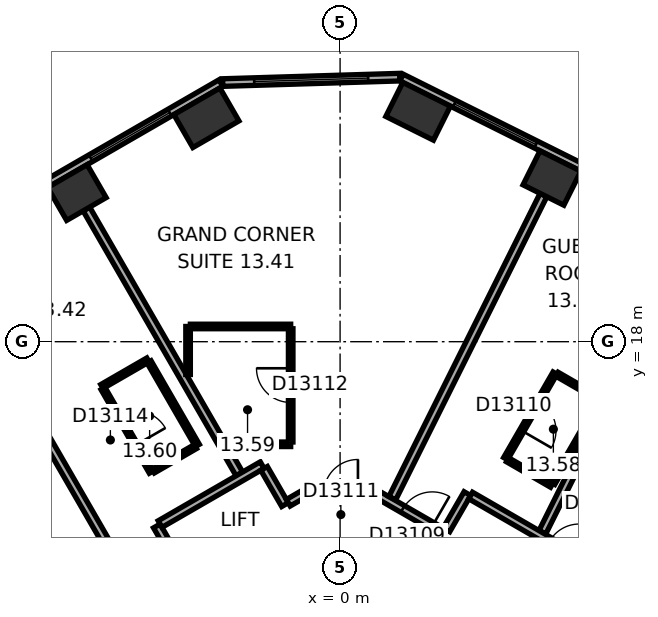
"""IFC4 building model, lengths in metres.
Left out: names, types, materials, properties, quantities, classifications, styles, units other than length and angle.
Written with IfcOpenShell. Run it as: python <this file> out.ifc"""

import sys

from ifc_helpers import new_model, si_unit, direction, frame, frame_2d, origin, origin_2d, place, context, subcontext, project, spatial, rectangle, extrude, element, fill, save


model = new_model("IFC4")
c1 = context("Model", 3, precision=1e-05, world=origin(), true_north=direction((0.0, 1.0)))
c2 = subcontext(c1, "Body", "Model", "MODEL_VIEW")
j1 = project(units=[si_unit("LENGTHUNIT", "METRE"), si_unit("PLANEANGLEUNIT", "RADIAN")], contexts=[c1])
p1 = place(None, origin())
s1 = spatial("IfcSite", under=j1, at=p1, CompositionType="ELEMENT")
p2 = place(p1, origin())
s2 = spatial("IfcBuilding", under=s1, at=p2, CompositionType="ELEMENT")
p3 = place(p2, frame((0.0, 0.0, 63.8)))
s3 = spatial("IfcBuildingStorey", under=s2, at=p3, CompositionType="ELEMENT", Elevation=63.8)
p4 = place(p3, frame((5.574, 22.306, 0.0), z_axis=(0.0, 0.0, 1.0), x_axis=(-0.894934361602, 0.44619781311, 0.0)))
e1 = element("IfcColumn", 1, at=p4, inside=s3, PredefinedType="COLUMN", context=c2, shape_type="SweptSolid", body=[
    extrude(rectangle(XDim=1.2, YDim=1.0, at=origin_2d()), origin(), (0.0, 0.0, 1.0), 3.3),
])
for number, where, z_axis, x_axis in (
    (2, (2.053, 24.062, 0.0), (0.0, 0.0, 1.0), (-0.895, 0.446, 0.0)),
    (3, (-3.518, 23.892, 0.0), (0.0, 0.0, 1.0), (-0.866, -0.5, 0.0)),
):
    element("IfcColumn", number, at=place(p3, frame(where, z_axis=z_axis, x_axis=x_axis)), inside=s3, PredefinedType="COLUMN", context=c2, shape_type="SweptSolid", body=[
        extrude(rectangle(XDim=1.4, YDim=1.0, at=origin_2d()), origin(), (0.0, 0.0, 1.0), 3.3),
    ])
p5 = place(p3, frame((-6.926, 21.925, 0.0), z_axis=(0.0, 0.0, 1.0), x_axis=(-0.866025403784, -0.5, 0.0)))
e4 = element("IfcColumn", 4, at=p5, inside=s3, PredefinedType="COLUMN", context=c2, shape_type="SweptSolid", body=[
    extrude(rectangle(XDim=1.2, YDim=1.0, at=origin_2d()), origin(), (0.0, 0.0, 1.0), 3.3),
])
p6 = place(p3, frame((20.63, 15.47, 0.0), z_axis=(0.0, 0.0, 1.0), x_axis=(-0.894934518609, 0.446197498203, 0.0)))
e5 = element("IfcWall", 5, at=p6, inside=s3, PredefinedType="STANDARD", context=c2, shape_type="SweptSolid", body=[
    extrude(rectangle(XDim=21.246, YDim=0.2, at=frame_2d((10.623, 0.0))), origin(), (0.0, 0.0, 1.0), 3.3),
])
p7 = place(p6, frame((1.553, 0.0, 0.8)))
e6 = element("IfcOpeningElement", 6, at=p7, cuts=e5, PredefinedType="OPENING", context=c2, shape_type="SweptSolid", body=[
    extrude(rectangle(XDim=2.4, YDim=1.7, at=frame_2d((1.2, 0.85))), frame((0.0, 0.11, 0.0), z_axis=(0.0, -1.0, 0.0), x_axis=(1.0, 0.0, 0.0)), (0.0, 0.0, 1.0), 0.22),
])
p8 = place(p6, frame((5.488, 0.0, 0.8)))
e7 = element("IfcOpeningElement", 7, at=p8, cuts=e5, PredefinedType="OPENING", context=c2, shape_type="SweptSolid", body=[
    extrude(rectangle(XDim=2.4, YDim=1.7, at=frame_2d((1.2, 0.85))), frame((0.0, 0.11, 0.0), z_axis=(0.0, -1.0, 0.0), x_axis=(1.0, 0.0, 0.0)), (0.0, 0.0, 1.0), 0.22),
])
p9 = place(p6, frame((9.422, 0.0, 0.8)))
e8 = element("IfcOpeningElement", 8, at=p9, cuts=e5, PredefinedType="OPENING", context=c2, shape_type="SweptSolid", body=[
    extrude(rectangle(XDim=2.4, YDim=1.7, at=frame_2d((1.2, 0.85))), frame((0.0, 0.11, 0.0), z_axis=(0.0, -1.0, 0.0), x_axis=(1.0, 0.0, 0.0)), (0.0, 0.0, 1.0), 0.22),
])
p10 = place(p6, frame((13.357, 0.0, 0.8)))
e9 = element("IfcOpeningElement", 9, at=p10, cuts=e5, PredefinedType="OPENING", context=c2, shape_type="SweptSolid", body=[
    extrude(rectangle(XDim=2.4, YDim=1.7, at=frame_2d((1.2, 0.85))), frame((0.0, 0.11, 0.0), z_axis=(0.0, -1.0, 0.0), x_axis=(1.0, 0.0, 0.0)), (0.0, 0.0, 1.0), 0.22),
])
p11 = place(p6, frame((17.292, 0.0, 0.8)))
e10 = element("IfcOpeningElement", 10, at=p11, cuts=e5, PredefinedType="OPENING", context=c2, shape_type="SweptSolid", body=[
    extrude(rectangle(XDim=2.4, YDim=1.7, at=frame_2d((1.2, 0.85))), frame((0.0, 0.11, 0.0), z_axis=(0.0, -1.0, 0.0), x_axis=(1.0, 0.0, 0.0)), (0.0, 0.0, 1.0), 0.22),
])
p12 = place(p3, frame((1.568, 24.961, 0.0), z_axis=(0.0, 0.0, 1.0), x_axis=(-0.999533359013, -0.030546099927, 0.0)))
e11 = element("IfcWall", 11, at=p12, inside=s3, PredefinedType="STANDARD", context=c2, shape_type="SweptSolid", body=[
    extrude(rectangle(XDim=4.66, YDim=0.2, at=frame_2d((2.33, 0.0))), origin(), (0.0, 0.0, 1.0), 3.3),
])
p13 = place(p12, frame((0.83, 0.0, 0.8)))
e12 = element("IfcOpeningElement", 12, at=p13, cuts=e11, PredefinedType="OPENING", context=c2, shape_type="SweptSolid", body=[
    extrude(rectangle(XDim=3.0, YDim=1.7, at=frame_2d((1.5, 0.85))), frame((0.0, 0.11, 0.0), z_axis=(0.0, -1.0, 0.0), x_axis=(1.0, 0.0, 0.0)), (0.0, 0.0, 1.0), 0.22),
])
p14 = place(p3, frame((-3.136, 24.805, 0.0), z_axis=(0.0, 0.0, 1.0), x_axis=(-0.866028291626, -0.499994998079, 0.0)))
e13 = element("IfcWall", 13, at=p14, inside=s3, PredefinedType="STANDARD", context=c2, shape_type="SweptSolid", body=[
    extrude(rectangle(XDim=21.246, YDim=0.2, at=frame_2d((10.623, 0.0))), origin(), (0.0, 0.0, 1.0), 3.3),
])
p15 = place(p14, frame((1.555, 0.0, 0.8)))
e14 = element("IfcOpeningElement", 14, at=p15, cuts=e13, PredefinedType="OPENING", context=c2, shape_type="SweptSolid", body=[
    extrude(rectangle(XDim=2.4, YDim=1.7, at=frame_2d((1.2, 0.85))), frame((0.0, 0.11, 0.0), z_axis=(0.0, -1.0, 0.0), x_axis=(1.0, 0.0, 0.0)), (0.0, 0.0, 1.0), 0.22),
])
p16 = place(p14, frame((5.489, 0.0, 0.8)))
e15 = element("IfcOpeningElement", 15, at=p16, cuts=e13, PredefinedType="OPENING", context=c2, shape_type="SweptSolid", body=[
    extrude(rectangle(XDim=2.4, YDim=1.7, at=frame_2d((1.2, 0.85))), frame((0.0, 0.11, 0.0), z_axis=(0.0, -1.0, 0.0), x_axis=(1.0, 0.0, 0.0)), (0.0, 0.0, 1.0), 0.22),
])
p17 = place(p14, frame((9.424, 0.0, 0.8)))
e16 = element("IfcOpeningElement", 16, at=p17, cuts=e13, PredefinedType="OPENING", context=c2, shape_type="SweptSolid", body=[
    extrude(rectangle(XDim=2.4, YDim=1.7, at=frame_2d((1.2, 0.85))), frame((0.0, 0.11, 0.0), z_axis=(0.0, -1.0, 0.0), x_axis=(1.0, 0.0, 0.0)), (0.0, 0.0, 1.0), 0.22),
])
p18 = place(p14, frame((13.358, 0.0, 0.8)))
e17 = element("IfcOpeningElement", 17, at=p18, cuts=e13, PredefinedType="OPENING", context=c2, shape_type="SweptSolid", body=[
    extrude(rectangle(XDim=2.4, YDim=1.7, at=frame_2d((1.2, 0.85))), frame((0.0, 0.11, 0.0), z_axis=(0.0, -1.0, 0.0), x_axis=(1.0, 0.0, 0.0)), (0.0, 0.0, 1.0), 0.22),
])
p19 = place(p14, frame((17.293, 0.0, 0.8)))
e18 = element("IfcOpeningElement", 18, at=p19, cuts=e13, PredefinedType="OPENING", context=c2, shape_type="SweptSolid", body=[
    extrude(rectangle(XDim=2.4, YDim=1.7, at=frame_2d((1.2, 0.85))), frame((0.0, 0.11, 0.0), z_axis=(0.0, -1.0, 0.0), x_axis=(1.0, 0.0, 0.0)), (0.0, 0.0, 1.0), 0.22),
])
p20 = place(p3, frame((-10.083, 19.524, 0.0), z_axis=(0.0, 0.0, 1.0), x_axis=(0.499999662836, -0.866025598446, 0.0)))
e19 = element("IfcWall", 19, at=p20, inside=s3, PredefinedType="PARTITIONING", context=c2, shape_type="SweptSolid", body=[
    extrude(rectangle(XDim=9.25, YDim=0.2, at=frame_2d((4.625, 0.0))), origin(), (0.0, 0.0, 1.0), 2.6),
])
p21 = place(p3, frame((-6.676, 21.492, 0.0), z_axis=(0.0, 0.0, 1.0), x_axis=(0.500011263043, -0.866018900966, 0.0)))
e20 = element("IfcWall", 20, at=p21, inside=s3, PredefinedType="PARTITIONING", context=c2, shape_type="SweptSolid", body=[
    extrude(rectangle(XDim=8.049, YDim=0.2, at=frame_2d((4.024, 0.0))), origin(), (0.0, 0.0, 1.0), 3.05),
])
p22 = place(p3, frame((-6.268, 16.82, 0.0), z_axis=(0.0, 0.0, 1.0), x_axis=(0.866002662425, 0.500039387122, 0.0)))
e21 = element("IfcWall", 21, at=p22, inside=s3, PredefinedType="PARTITIONING", context=c2, shape_type="SweptSolid", body=[
    extrude(rectangle(XDim=1.4, YDim=0.12, at=frame_2d((0.7, 0.0))), origin(), (0.0, 0.0, 1.0), 3.05),
])
p23 = place(p3, frame((-5.026, 17.469, 0.0), z_axis=(0.0, 0.0, 1.0), x_axis=(0.500005339912, -0.866022320763, 0.0)))
e22 = element("IfcWall", 22, at=p23, inside=s3, PredefinedType="PARTITIONING", context=c2, shape_type="SweptSolid", body=[
    extrude(rectangle(XDim=2.54, YDim=0.12, at=frame_2d((1.27, 0.0))), origin(), (0.0, 0.0, 1.0), 3.05),
])
p24 = place(p3, frame((-4.968, 14.569, 0.0), z_axis=(0.0, 0.0, 1.0), x_axis=(-0.500046963369, 0.865998287773, 0.0)))
e23 = element("IfcWall", 23, at=p24, inside=s3, PredefinedType="PARTITIONING", context=c2, shape_type="SweptSolid", body=[
    extrude(rectangle(XDim=2.54, YDim=0.12, at=frame_2d((1.27, 0.0))), origin(), (0.0, 0.0, 1.0), 3.05),
])
p25 = place(p24, frame((0.82, 0.0, 0.0)))
e24 = element("IfcOpeningElement", 24, at=p25, cuts=e23, PredefinedType="OPENING", context=c2, shape_type="SweptSolid", body=[
    extrude(rectangle(XDim=0.9, YDim=2.1, at=frame_2d((0.45, 1.05))), frame((0.0, 0.07, 0.0), z_axis=(0.0, -1.0, 0.0), x_axis=(1.0, 0.0, 0.0)), (0.0, 0.0, 1.0), 0.14),
])
p26 = place(p3, frame((-4.823, 13.152, 0.0), z_axis=(0.0, 0.0, 1.0), x_axis=(0.499986357472, -0.866033280158, 0.0)))
e25 = element("IfcWall", 25, at=p26, inside=s3, PredefinedType="PARTITIONING", context=c2, shape_type="SweptSolid", body=[
    extrude(rectangle(XDim=1.201, YDim=0.2, at=frame_2d((0.601, 0.0))), origin(), (0.0, 0.0, 1.0), 3.05),
])
p27 = place(p3, frame((-4.0, 17.137, 0.0), z_axis=(0.0, 0.0, 1.0), x_axis=(0.0, 1.0, 0.0)))
e26 = element("IfcWall", 26, at=p27, inside=s3, PredefinedType="PARTITIONING", context=c2, shape_type="SweptSolid", body=[
    extrude(rectangle(XDim=1.263, YDim=0.12, at=frame_2d((0.632, 0.0))), origin(), (0.0, 0.0, 1.0), 3.05),
])
p28 = place(p3, frame((-3.94, 18.401, 0.0), z_axis=(0.0, 0.0, 1.0), x_axis=(1.0, 0.0, 0.0)))
e27 = element("IfcWall", 27, at=p28, inside=s3, PredefinedType="PARTITIONING", context=c2, shape_type="SweptSolid", body=[
    extrude(rectangle(XDim=2.64, YDim=0.12, at=frame_2d((1.32, 0.0))), origin(), (0.0, 0.0, 1.0), 3.05),
])
p29 = place(p3, frame((-3.808, 15.239, 0.0), z_axis=(0.0, 0.0, 1.0), x_axis=(-0.866087136806, -0.499893060024, 0.0)))
e28 = element("IfcWall", 28, at=p29, inside=s3, PredefinedType="PARTITIONING", context=c2, shape_type="SweptSolid", body=[
    extrude(rectangle(XDim=1.28, YDim=0.12, at=frame_2d((0.64, 0.0))), origin(), (0.0, 0.0, 1.0), 3.05),
])
p30 = place(p3, frame((-2.05, 14.752, 0.0), z_axis=(0.0, 0.0, 1.0), x_axis=(-0.866030936828, -0.499990416364, 0.0)))
e29 = element("IfcWall", 29, at=p30, inside=s3, PredefinedType="PARTITIONING", context=c2, shape_type="SweptSolid", body=[
    extrude(rectangle(XDim=3.102, YDim=0.2, at=frame_2d((1.551, 0.0))), origin(), (0.0, 0.0, 1.0), 3.05),
])
p31 = place(p3, frame((-1.449, 13.712, 0.0), z_axis=(0.0, 0.0, 1.0), x_axis=(-0.499978356969, 0.866037899034, 0.0)))
e30 = element("IfcWall", 30, at=p31, inside=s3, PredefinedType="PARTITIONING", context=c2, shape_type="SweptSolid", body=[
    extrude(rectangle(XDim=1.101, YDim=0.2, at=frame_2d((0.551, 0.0))), origin(), (0.0, 0.0, 1.0), 3.05),
])
p32 = place(p3, frame((-1.3, 15.301, 0.0), z_axis=(0.0, 0.0, 1.0), x_axis=(-1.0, 0.0, 0.0)))
e31 = element("IfcWall", 31, at=p32, inside=s3, PredefinedType="PARTITIONING", context=c2, shape_type="SweptSolid", body=[
    extrude(rectangle(XDim=1.661, YDim=0.12, at=frame_2d((0.831, 0.0))), origin(), (0.0, 0.0, 1.0), 3.05),
])
p33 = place(p3, frame((-1.3, 18.341, 0.0), z_axis=(0.0, 0.0, 1.0), x_axis=(0.0, -1.0, 0.0)))
e32 = element("IfcWall", 32, at=p33, inside=s3, PredefinedType="PARTITIONING", context=c2, shape_type="SweptSolid", body=[
    extrude(rectangle(XDim=2.98, YDim=0.12, at=frame_2d((1.49, 0.0))), origin(), (0.0, 0.0, 1.0), 3.05),
])
p34 = place(p33, frame((1.04, 0.0, 0.0)))
e33 = element("IfcOpeningElement", 33, at=p34, cuts=e32, PredefinedType="OPENING", context=c2, shape_type="SweptSolid", body=[
    extrude(rectangle(XDim=0.9, YDim=2.1, at=frame_2d((0.45, 1.05))), frame((0.0, 0.07, 0.0), z_axis=(0.0, -1.0, 0.0), x_axis=(1.0, 0.0, 0.0)), (0.0, 0.0, 1.0), 0.14),
])
p35 = place(p3, frame((-0.95, 14.001, 0.0), z_axis=(0.0, 0.0, 1.0), x_axis=(-0.86609177584, -0.499885022602, 0.0)))
e34 = element("IfcWall", 34, at=p35, inside=s3, PredefinedType="PARTITIONING", context=c2, shape_type="SweptSolid", body=[
    extrude(rectangle(XDim=0.477, YDim=0.2, at=frame_2d((0.238, 0.0))), origin(), (0.0, 0.0, 1.0), 3.05),
])
p36 = place(p3, frame((0.95, 14.001, 0.0), z_axis=(0.0, 0.0, 1.0), x_axis=(-1.0, 0.0, 0.0)))
e35 = element("IfcWall", 35, at=p36, inside=s3, PredefinedType="PARTITIONING", context=c2, shape_type="SweptSolid", body=[
    extrude(rectangle(XDim=1.86, YDim=0.2, at=frame_2d((0.93, 0.0))), origin(), (0.0, 0.0, 1.0), 3.05),
])
p37 = place(p36, frame((0.48, 0.0, 0.0)))
e36 = element("IfcOpeningElement", 36, at=p37, cuts=e35, PredefinedType="OPENING", context=c2, shape_type="SweptSolid", body=[
    extrude(rectangle(XDim=0.9, YDim=2.1, at=frame_2d((0.45, 1.05))), frame((0.0, 0.11, 0.0), z_axis=(0.0, -1.0, 0.0), x_axis=(1.0, 0.0, 0.0)), (0.0, 0.0, 1.0), 0.22),
])
p38 = place(p3, frame((2.748, 12.962, 0.0), z_axis=(0.0, 0.0, 1.0), x_axis=(-0.866013897511, 0.50001992892, 0.0)))
e37 = element("IfcWall", 37, at=p38, inside=s3, PredefinedType="PARTITIONING", context=c2, shape_type="SweptSolid", body=[
    extrude(rectangle(XDim=2.037, YDim=0.2, at=frame_2d((1.018, 0.0))), origin(), (0.0, 0.0, 1.0), 3.05),
])
p39 = place(p38, frame((0.372, 0.0, 0.0)))
e38 = element("IfcOpeningElement", 38, at=p39, cuts=e37, PredefinedType="OPENING", context=c2, shape_type="SweptSolid", body=[
    extrude(rectangle(XDim=0.9, YDim=2.1, at=frame_2d((0.45, 1.05))), frame((0.0, 0.11, 0.0), z_axis=(0.0, -1.0, 0.0), x_axis=(1.0, 0.0, 0.0)), (0.0, 0.0, 1.0), 0.22),
])
p40 = place(p3, frame((3.349, 14.002, 0.0), z_axis=(0.0, 0.0, 1.0), x_axis=(-0.500074377092, -0.865982457891, 0.0)))
e39 = element("IfcWall", 39, at=p40, inside=s3, PredefinedType="PARTITIONING", context=c2, shape_type="SweptSolid", body=[
    extrude(rectangle(XDim=1.101, YDim=0.2, at=frame_2d((0.55, 0.0))), origin(), (0.0, 0.0, 1.0), 3.05),
])
p41 = place(p3, frame((4.356, 14.922, 0.0), z_axis=(0.0, 0.0, 1.0), x_axis=(0.499936506574, 0.866062058628, 0.0)))
e40 = element("IfcWall", 40, at=p41, inside=s3, PredefinedType="PARTITIONING", context=c2, shape_type="SweptSolid", body=[
    extrude(rectangle(XDim=2.6, YDim=0.12, at=frame_2d((1.3, 0.0))), origin(), (0.0, 0.0, 1.0), 3.05),
])
p42 = place(p41, frame((0.85, 0.0, 0.0)))
e41 = element("IfcOpeningElement", 41, at=p42, cuts=e40, PredefinedType="OPENING", context=c2, shape_type="SweptSolid", body=[
    extrude(rectangle(XDim=0.9, YDim=2.1, at=frame_2d((0.45, 1.05))), frame((0.0, 0.07, 0.0), z_axis=(0.0, -1.0, 0.0), x_axis=(1.0, 0.0, 0.0)), (0.0, 0.0, 1.0), 0.14),
])
p43 = place(p3, frame((5.351, 21.859, 0.0), z_axis=(0.0, 0.0, 1.0), x_axis=(-0.446205309328, -0.894930624086, 0.0)))
e42 = element("IfcWall", 42, at=p43, inside=s3, PredefinedType="PARTITIONING", context=c2, shape_type="SweptSolid", body=[
    extrude(rectangle(XDim=8.913, YDim=0.2, at=frame_2d((4.457, 0.0))), origin(), (0.0, 0.0, 1.0), 2.6),
])
p44 = place(p3, frame((5.569, 14.222, 0.0), z_axis=(0.0, 0.0, 1.0), x_axis=(-0.866036909293, 0.499980071345, 0.0)))
e43 = element("IfcWall", 43, at=p44, inside=s3, PredefinedType="PARTITIONING", context=c2, shape_type="SweptSolid", body=[
    extrude(rectangle(XDim=1.34, YDim=0.12, at=frame_2d((0.67, 0.0))), origin(), (0.0, 0.0, 1.0), 3.05),
])
p45 = place(p3, frame((5.708, 17.144, 0.0), z_axis=(0.0, 0.0, 1.0), x_axis=(0.866082447003, -0.499901185229, 0.0)))
e44 = element("IfcWall", 44, at=p45, inside=s3, PredefinedType="PARTITIONING", context=c2, shape_type="SweptSolid", body=[
    extrude(rectangle(XDim=1.34, YDim=0.12, at=frame_2d((0.67, 0.0))), origin(), (0.0, 0.0, 1.0), 3.05),
])
p46 = place(p3, frame((6.839, 16.422, 0.0), z_axis=(0.0, 0.0, 1.0), x_axis=(-0.50000366821, -0.866023285932, 0.0)))
e45 = element("IfcWall", 45, at=p46, inside=s3, PredefinedType="PARTITIONING", context=c2, shape_type="SweptSolid", body=[
    extrude(rectangle(XDim=2.48, YDim=0.12, at=frame_2d((1.24, 0.0))), origin(), (0.0, 0.0, 1.0), 3.05),
])
p47 = place(p3, frame((8.872, 20.104, 0.0), z_axis=(0.0, 0.0, 1.0), x_axis=(-0.446218378653, -0.894924107706, 0.0)))
e46 = element("IfcWall", 46, at=p47, inside=s3, PredefinedType="PARTITIONING", context=c2, shape_type="SweptSolid", body=[
    extrude(rectangle(XDim=7.95, YDim=0.2, at=frame_2d((3.975, 0.0))), origin(), (0.0, 0.0, 1.0), 3.05),
])
p48 = place(p3, frame((10.885, 9.652, 0.0), z_axis=(0.0, 0.0, 1.0), x_axis=(-0.866033868542, 0.499985338323, 0.0)))
e47 = element("IfcWall", 47, at=p48, inside=s3, PredefinedType="PARTITIONING", context=c2, shape_type="SweptSolid", body=[
    extrude(rectangle(XDim=8.602, YDim=0.2, at=frame_2d((4.301, 0.0))), origin(), (0.0, 0.0, 1.0), 3.05),
])
p49 = place(p48, frame((5.302, 0.0, 0.0)))
e48 = element("IfcOpeningElement", 48, at=p49, cuts=e47, PredefinedType="OPENING", context=c2, shape_type="SweptSolid", body=[
    extrude(rectangle(XDim=0.9, YDim=2.1, at=frame_2d((0.45, 1.05))), frame((0.0, 0.11, 0.0), z_axis=(0.0, -1.0, 0.0), x_axis=(1.0, 0.0, 0.0)), (0.0, 0.0, 1.0), 0.22),
])
p50 = place(p11, origin())
e49 = element("IfcWindow", 49, at=p50, inside=s3, PartitioningType="SINGLE_PANEL", PredefinedType="WINDOW", context=c2, shape_type="SweptSolid", body=[
    extrude(rectangle(XDim=2.4, YDim=1.7, at=frame_2d((1.2, 0.85))), frame((0.0, 0.03, 0.0), z_axis=(0.0, -1.0, 0.0), x_axis=(1.0, 0.0, 0.0)), (0.0, 0.0, 1.0), 0.06),
])
fill(e10, e49)
p51 = place(p13, origin())
e50 = element("IfcWindow", 50, at=p51, inside=s3, PartitioningType="SINGLE_PANEL", PredefinedType="WINDOW", context=c2, shape_type="SweptSolid", body=[
    extrude(rectangle(XDim=3.0, YDim=1.7, at=frame_2d((1.5, 0.85))), frame((0.0, 0.03, 0.0), z_axis=(0.0, -1.0, 0.0), x_axis=(1.0, 0.0, 0.0)), (0.0, 0.0, 1.0), 0.06),
])
fill(e12, e50)
p52 = place(p15, origin())
e51 = element("IfcWindow", 51, at=p52, inside=s3, PartitioningType="SINGLE_PANEL", PredefinedType="WINDOW", context=c2, shape_type="SweptSolid", body=[
    extrude(rectangle(XDim=2.4, YDim=1.7, at=frame_2d((1.2, 0.85))), frame((0.0, 0.03, 0.0), z_axis=(0.0, -1.0, 0.0), x_axis=(1.0, 0.0, 0.0)), (0.0, 0.0, 1.0), 0.06),
])
fill(e14, e51)
p53 = place(p39, origin())
e52 = element("IfcDoor", 52, at=p53, inside=s3, OperationType="SINGLE_SWING_LEFT", PredefinedType="DOOR", context=c2, shape_type="SweptSolid", body=[
    extrude(rectangle(XDim=0.9, YDim=2.1, at=frame_2d((0.45, 1.05))), frame((0.0, 0.025, 0.0), z_axis=(0.0, -1.0, 0.0), x_axis=(1.0, 0.0, 0.0)), (0.0, 0.0, 1.0), 0.05),
])
fill(e38, e52)
p54 = place(p42, origin())
e53 = element("IfcDoor", 53, at=p54, inside=s3, OperationType="SINGLE_SWING_LEFT", PredefinedType="DOOR", context=c2, shape_type="SweptSolid", body=[
    extrude(rectangle(XDim=0.9, YDim=2.1, at=frame_2d((0.45, 1.05))), frame((0.0, 0.025, 0.0), z_axis=(0.0, -1.0, 0.0), x_axis=(1.0, 0.0, 0.0)), (0.0, 0.0, 1.0), 0.05),
])
fill(e41, e53)
p55 = place(p37, origin())
e54 = element("IfcDoor", 54, at=p55, inside=s3, OperationType="SINGLE_SWING_LEFT", PredefinedType="DOOR", context=c2, shape_type="SweptSolid", body=[
    extrude(rectangle(XDim=0.9, YDim=2.1, at=frame_2d((0.45, 1.05))), frame((0.0, 0.025, 0.0), z_axis=(0.0, -1.0, 0.0), x_axis=(1.0, 0.0, 0.0)), (0.0, 0.0, 1.0), 0.05),
])
fill(e36, e54)
p56 = place(p34, origin())
e55 = element("IfcDoor", 55, at=p56, inside=s3, OperationType="SINGLE_SWING_LEFT", PredefinedType="DOOR", context=c2, shape_type="SweptSolid", body=[
    extrude(rectangle(XDim=0.9, YDim=2.1, at=frame_2d((0.45, 1.05))), frame((0.0, 0.025, 0.0), z_axis=(0.0, -1.0, 0.0), x_axis=(1.0, 0.0, 0.0)), (0.0, 0.0, 1.0), 0.05),
])
fill(e33, e55)
p57 = place(p25, origin())
e56 = element("IfcDoor", 56, at=p57, inside=s3, OperationType="SINGLE_SWING_LEFT", PredefinedType="DOOR", context=c2, shape_type="SweptSolid", body=[
    extrude(rectangle(XDim=0.9, YDim=2.1, at=frame_2d((0.45, 1.05))), frame((0.0, 0.025, 0.0), z_axis=(0.0, -1.0, 0.0), x_axis=(1.0, 0.0, 0.0)), (0.0, 0.0, 1.0), 0.05),
])
fill(e24, e56)
save(model, sys.argv[1])
